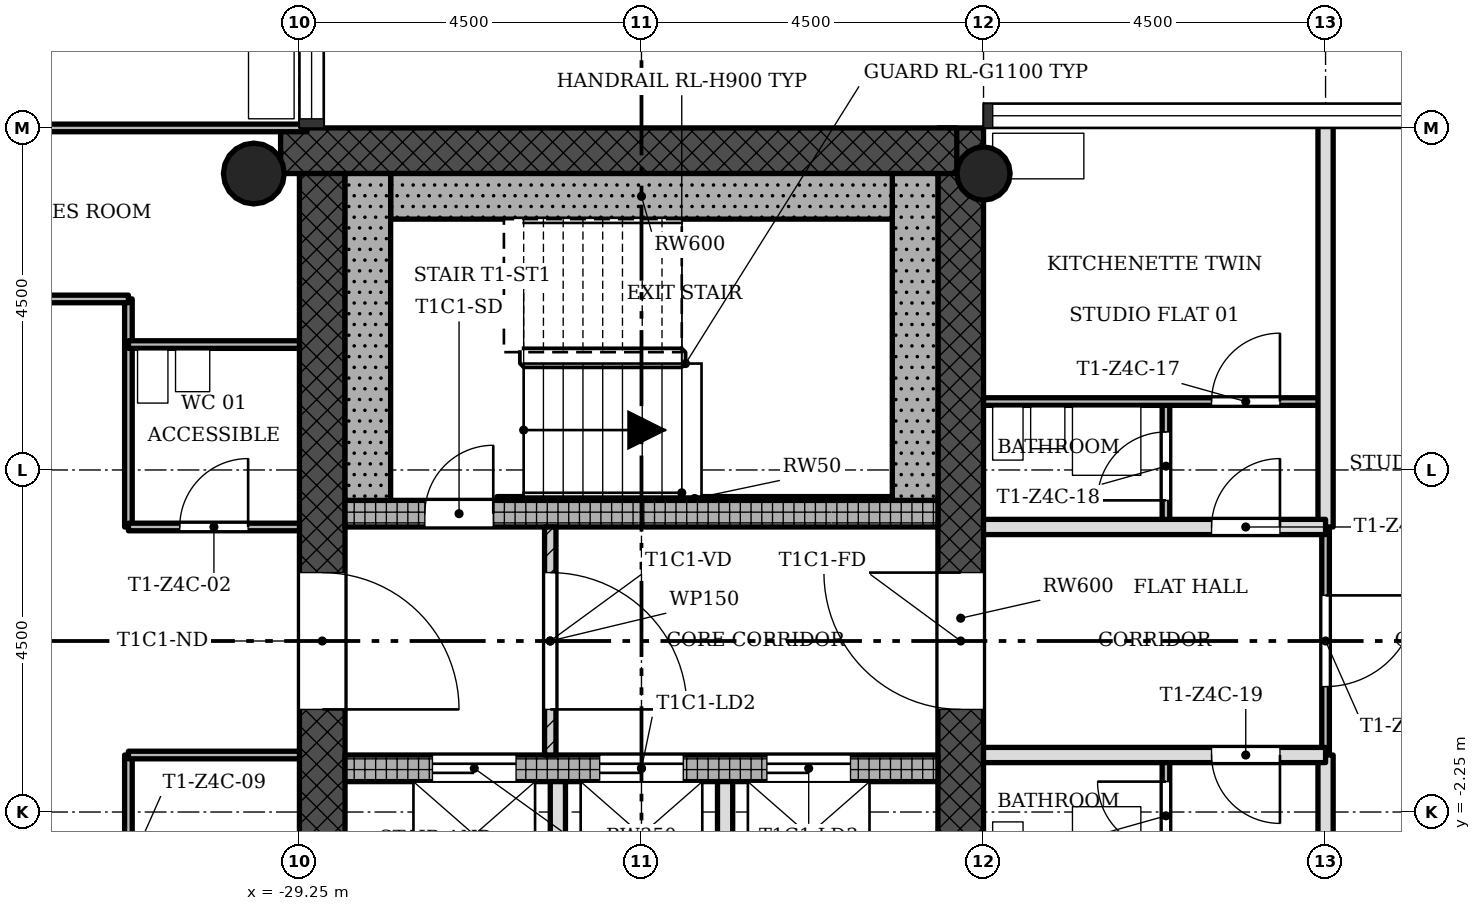
"""IFC4 building model, lengths in metres.
Left out: names, types, materials, properties, quantities, classifications, styles, units other than length and angle.
Written with IfcOpenShell. Run it as: python <this file> out.ifc"""

import sys

from ifc_helpers import new_model, si_unit, direction, frame, frame_2d, origin, origin_2d, place, context, subcontext, project, spatial, rectangle, hollow_circle, extrude, element, fill, save


model = new_model("IFC4")
c1 = context("Model", 3, precision=1e-05, world=origin(), true_north=direction((0.0, 1.0)))
c2 = subcontext(c1, "Body", "Model", "MODEL_VIEW")
j1 = project(units=[si_unit("LENGTHUNIT", "METRE"), si_unit("PLANEANGLEUNIT", "RADIAN")], contexts=[c1])
p1 = place(None, origin())
s1 = spatial("IfcSite", under=j1, at=p1, CompositionType="ELEMENT")
p2 = place(p1, origin())
s2 = spatial("IfcBuilding", under=s1, at=p2, CompositionType="ELEMENT")
p3 = place(p2, frame((0.0, 0.0, 192.6)))
s3 = spatial("IfcBuildingStorey", under=s2, at=p3, CompositionType="ELEMENT", Elevation=192.6)
p4 = place(p3, frame((-20.55, -6.15, 0.0), z_axis=(0.0, 0.0, 1.0), x_axis=(0.0, 1.0, 0.0)))
e1 = element("IfcWall", 1, at=p4, inside=s3, PredefinedType="SHEAR", context=c2, shape_type="SweptSolid", body=[
    extrude(rectangle(XDim=12.9, YDim=0.6, at=frame_2d((6.45, 0.0))), origin(), (0.0, 0.0, 1.0), 3.4),
])
p5 = place(p4, frame((5.25, 0.0, 0.0)))
e2 = element("IfcOpeningElement", 2, at=p5, cuts=e1, PredefinedType="OPENING", context=c2, shape_type="SweptSolid", body=[
    extrude(rectangle(XDim=1.8, YDim=2.1, at=frame_2d((0.9, 1.05))), frame((0.0, 0.31, 0.0), z_axis=(0.0, -1.0, 0.0), x_axis=(1.0, 0.0, 0.0)), (0.0, 0.0, 1.0), 0.62),
])
p6 = place(p3, frame((-20.602, 6.45, 0.0), z_axis=(0.0, 0.0, 1.0), x_axis=(-1.0, 0.0, 0.0)))
e3 = element("IfcWall", 3, at=p6, inside=s3, PredefinedType="SHEAR", context=c2, shape_type="SweptSolid", body=[
    extrude(rectangle(XDim=8.896, YDim=0.6, at=frame_2d((4.448, 0.0))), origin(), (0.0, 0.0, 1.0), 3.4),
])
p7 = place(p3, frame((-28.95, 6.15, 0.0), z_axis=(0.0, 0.0, 1.0), x_axis=(0.0, -1.0, 0.0)))
e4 = element("IfcWall", 4, at=p7, inside=s3, PredefinedType="SHEAR", context=c2, shape_type="SweptSolid", body=[
    extrude(rectangle(XDim=12.9, YDim=0.6, at=frame_2d((6.45, 0.0))), origin(), (0.0, 0.0, 1.0), 3.4),
])
p8 = place(p7, frame((5.25, 0.0, 0.0)))
e5 = element("IfcOpeningElement", 5, at=p8, cuts=e4, PredefinedType="OPENING", context=c2, shape_type="SweptSolid", body=[
    extrude(rectangle(XDim=1.8, YDim=2.1, at=frame_2d((0.9, 1.05))), frame((0.0, 0.31, 0.0), z_axis=(0.0, -1.0, 0.0), x_axis=(1.0, 0.0, 0.0)), (0.0, 0.0, 1.0), 0.62),
])
p9 = place(p3, frame((-28.65, -1.675, 0.0), z_axis=(0.0, 0.0, 1.0), x_axis=(1.0, 0.0, 0.0)))
e6 = element("IfcWall", 6, at=p9, inside=s3, PredefinedType="SHEAR", context=c2, shape_type="SweptSolid", body=[
    extrude(rectangle(XDim=7.8, YDim=0.35, at=frame_2d((3.9, 0.0))), origin(), (0.0, 0.0, 1.0), 3.4),
])
p10 = place(p9, frame((1.15, 0.0, 0.0)))
e7 = element("IfcOpeningElement", 7, at=p10, cuts=e6, PredefinedType="OPENING", context=c2, shape_type="SweptSolid", body=[
    extrude(rectangle(XDim=1.1, YDim=2.1, at=frame_2d((0.55, 1.05))), frame((0.0, 0.185, 0.0), z_axis=(0.0, -1.0, 0.0), x_axis=(1.0, 0.0, 0.0)), (0.0, 0.0, 1.0), 0.37),
])
p11 = place(p9, frame((3.35, 0.0, 0.0)))
e8 = element("IfcOpeningElement", 8, at=p11, cuts=e6, PredefinedType="OPENING", context=c2, shape_type="SweptSolid", body=[
    extrude(rectangle(XDim=1.1, YDim=2.1, at=frame_2d((0.55, 1.05))), frame((0.0, 0.185, 0.0), z_axis=(0.0, -1.0, 0.0), x_axis=(1.0, 0.0, 0.0)), (0.0, 0.0, 1.0), 0.37),
])
p12 = place(p9, frame((5.55, 0.0, 0.0)))
e9 = element("IfcOpeningElement", 9, at=p12, cuts=e6, PredefinedType="OPENING", context=c2, shape_type="SweptSolid", body=[
    extrude(rectangle(XDim=1.1, YDim=2.1, at=frame_2d((0.55, 1.05))), frame((0.0, 0.185, 0.0), z_axis=(0.0, -1.0, 0.0), x_axis=(1.0, 0.0, 0.0)), (0.0, 0.0, 1.0), 0.37),
])
p13 = place(p3, frame((-28.65, 1.675, 0.0), z_axis=(0.0, 0.0, 1.0), x_axis=(1.0, 0.0, 0.0)))
e10 = element("IfcWall", 10, at=p13, inside=s3, PredefinedType="SHEAR", context=c2, shape_type="SweptSolid", body=[
    extrude(rectangle(XDim=7.8, YDim=0.35, at=frame_2d((3.9, 0.0))), origin(), (0.0, 0.0, 1.0), 3.4),
])
p14 = place(p13, frame((1.05, 0.0, 0.0)))
e11 = element("IfcOpeningElement", 11, at=p14, cuts=e10, PredefinedType="OPENING", context=c2, shape_type="SweptSolid", body=[
    extrude(rectangle(XDim=0.9, YDim=2.1, at=frame_2d((0.45, 1.05))), frame((0.0, 0.185, 0.0), z_axis=(0.0, -1.0, 0.0), x_axis=(1.0, 0.0, 0.0)), (0.0, 0.0, 1.0), 0.37),
])
p15 = place(p3, frame((-20.25, 6.15, 0.0), z_axis=(0.0, 0.0, 1.0), x_axis=(1.0, 0.0, 0.0)))
e12 = element("IfcColumn", 12, at=p15, inside=s3, PredefinedType="COLUMN", context=c2, shape_type="SweptSolid", body=[
    extrude(hollow_circle(Radius=0.35, WallThickness=0.025, at=origin_2d()), origin(), (0.0, 0.0, 1.0), 3.4),
])
p16 = place(p3, frame((-29.85, 6.15, 0.0), z_axis=(0.0, 0.0, 1.0), x_axis=(1.0, 0.0, 0.0)))
e13 = element("IfcColumn", 13, at=p16, inside=s3, PredefinedType="COLUMN", context=c2, shape_type="SweptSolid", body=[
    extrude(hollow_circle(Radius=0.4, WallThickness=0.028, at=origin_2d()), origin(), (0.0, 0.0, 1.0), 3.4),
])
p17 = place(p3, frame((-25.95, -1.5, 0.0), z_axis=(0.0, 0.0, 1.0), x_axis=(0.0, 1.0, 0.0)))
e14 = element("IfcWall", 14, at=p17, inside=s3, PredefinedType="PARTITIONING", context=c2, shape_type="SweptSolid", body=[
    extrude(rectangle(XDim=3.0, YDim=0.15, at=frame_2d((1.5, 0.0))), origin(), (0.0, 0.0, 1.0), 3.0),
])
p18 = place(p17, frame((0.6, 0.0, 0.0)))
e15 = element("IfcOpeningElement", 15, at=p18, cuts=e14, PredefinedType="OPENING", context=c2, shape_type="SweptSolid", body=[
    extrude(rectangle(XDim=1.8, YDim=2.1, at=frame_2d((0.9, 1.05))), frame((0.0, 0.085, 0.0), z_axis=(0.0, -1.0, 0.0), x_axis=(1.0, 0.0, 0.0)), (0.0, 0.0, 1.0), 0.17),
])
for number, where, z_axis, x_axis in (
    (16, (-25.85, -6.15, 0.0), (0.0, 0.0, 1.0), (0.0, 1.0, 0.0)),
    (17, (-23.65, -6.15, 0.0), (0.0, 0.0, 1.0), (0.0, 1.0, 0.0)),
):
    element("IfcWall", number, at=place(p3, frame(where, z_axis=z_axis, x_axis=x_axis)), inside=s3, PredefinedType="SOLIDWALL", context=c2, shape_type="SweptSolid", body=[
        extrude(rectangle(XDim=4.3, YDim=0.2, at=frame_2d((2.15, 0.0))), origin(), (0.0, 0.0, 1.0), 3.0),
    ])
p19 = place(p3, frame((-31.5, -6.75, 0.0), z_axis=(0.0, 0.0, 1.0), x_axis=(0.0, 1.0, 0.0)))
e18 = element("IfcWall", 18, at=p19, inside=s3, PredefinedType="PARTITIONING", context=c2, shape_type="SweptSolid", body=[
    extrude(rectangle(XDim=5.25, YDim=0.1, at=frame_2d((2.625, 0.0))), origin(), (0.0, 0.0, 1.0), 3.0),
])
p20 = place(p19, frame((3.3, 0.0, 0.0)))
e19 = element("IfcOpeningElement", 19, at=p20, cuts=e18, PredefinedType="OPENING", context=c2, shape_type="SweptSolid", body=[
    extrude(rectangle(XDim=0.9, YDim=2.1, at=frame_2d((0.45, 1.05))), frame((0.0, 0.06, 0.0), z_axis=(0.0, -1.0, 0.0), x_axis=(1.0, 0.0, 0.0)), (0.0, 0.0, 1.0), 0.12),
])
p21 = place(p3, frame((-31.5, 1.5, 0.0), z_axis=(0.0, 0.0, 1.0), x_axis=(0.0, 1.0, 0.0)))
e20 = element("IfcWall", 20, at=p21, inside=s3, PredefinedType="PARTITIONING", context=c2, shape_type="SweptSolid", body=[
    extrude(rectangle(XDim=3.0, YDim=0.1, at=frame_2d((1.5, 0.0))), origin(), (0.0, 0.0, 1.0), 3.0),
])
p22 = place(p3, frame((-17.85, -3.15, 0.0), z_axis=(0.0, 0.0, 1.0), x_axis=(0.0, 1.0, 0.0)))
e21 = element("IfcWall", 21, at=p22, inside=s3, PredefinedType="PARTITIONING", context=c2, shape_type="SweptSolid", body=[
    extrude(rectangle(XDim=1.65, YDim=0.1, at=frame_2d((0.825, 0.0))), origin(), (0.0, 0.0, 1.0), 3.0),
])
p23 = place(p22, frame((0.4, 0.0, 0.0)))
e22 = element("IfcOpeningElement", 22, at=p23, cuts=e21, PredefinedType="OPENING", context=c2, shape_type="SweptSolid", body=[
    extrude(rectangle(XDim=0.9, YDim=2.1, at=frame_2d((0.45, 1.05))), frame((0.0, 0.06, 0.0), z_axis=(0.0, -1.0, 0.0), x_axis=(1.0, 0.0, 0.0)), (0.0, 0.0, 1.0), 0.12),
])
p24 = place(p3, frame((-17.85, 1.5, 0.0), z_axis=(0.0, 0.0, 1.0), x_axis=(0.0, 1.0, 0.0)))
e23 = element("IfcWall", 23, at=p24, inside=s3, PredefinedType="PARTITIONING", context=c2, shape_type="SweptSolid", body=[
    extrude(rectangle(XDim=1.65, YDim=0.1, at=frame_2d((0.825, 0.0))), origin(), (0.0, 0.0, 1.0), 3.0),
])
p25 = place(p24, frame((0.35, 0.0, 0.0)))
e24 = element("IfcOpeningElement", 24, at=p25, cuts=e23, PredefinedType="OPENING", context=c2, shape_type="SweptSolid", body=[
    extrude(rectangle(XDim=0.9, YDim=2.1, at=frame_2d((0.45, 1.05))), frame((0.0, 0.06, 0.0), z_axis=(0.0, -1.0, 0.0), x_axis=(1.0, 0.0, 0.0)), (0.0, 0.0, 1.0), 0.12),
])
p26 = place(p3, frame((-15.75, -1.5, 0.0), z_axis=(0.0, 0.0, 1.0), x_axis=(0.0, 1.0, 0.0)))
e25 = element("IfcWall", 25, at=p26, inside=s3, PredefinedType="PARTITIONING", context=c2, shape_type="SweptSolid", body=[
    extrude(rectangle(XDim=3.0, YDim=0.1, at=frame_2d((1.5, 0.0))), origin(), (0.0, 0.0, 1.0), 3.0),
])
p27 = place(p26, frame((0.9, 0.0, 0.0)))
e26 = element("IfcOpeningElement", 26, at=p27, cuts=e25, PredefinedType="OPENING", context=c2, shape_type="SweptSolid", body=[
    extrude(rectangle(XDim=1.2, YDim=2.1, at=frame_2d((0.6, 1.05))), frame((0.0, 0.06, 0.0), z_axis=(0.0, -1.0, 0.0), x_axis=(1.0, 0.0, 0.0)), (0.0, 0.0, 1.0), 0.12),
])
for number, where, z_axis, x_axis in (
    (27, (-15.75, -6.85, 0.0), (0.0, 0.0, 1.0), (0.0, 1.0, 0.0)),
    (28, (-15.75, 1.5, 0.0), (0.0, 0.0, 1.0), (0.0, 1.0, 0.0)),
):
    element("IfcWall", number, at=place(p3, frame(where, z_axis=z_axis, x_axis=x_axis)), inside=s3, PredefinedType="SOLIDWALL", context=c2, shape_type="SweptSolid", body=[
        extrude(rectangle(XDim=5.35, YDim=0.2, at=frame_2d((2.675, 0.0))), origin(), (0.0, 0.0, 1.0), 3.0),
    ])
p28 = place(p3, frame((-31.5, -1.5, 0.0), z_axis=(0.0, 0.0, 1.0), x_axis=(1.0, 0.0, 0.0)))
e29 = element("IfcWall", 29, at=p28, inside=s3, PredefinedType="PARTITIONING", context=c2, shape_type="SweptSolid", body=[
    extrude(rectangle(XDim=2.25, YDim=0.1, at=frame_2d((1.125, 0.0))), origin(), (0.0, 0.0, 1.0), 3.0),
])
p29 = place(p3, frame((-20.25, -1.5, 0.0), z_axis=(0.0, 0.0, 1.0), x_axis=(1.0, 0.0, 0.0)))
e30 = element("IfcWall", 30, at=p29, inside=s3, PredefinedType="SOLIDWALL", context=c2, shape_type="SweptSolid", body=[
    extrude(rectangle(XDim=4.5, YDim=0.2, at=frame_2d((2.25, 0.0))), origin(), (0.0, 0.0, 1.0), 3.0),
])
p30 = place(p29, frame((3.0, 0.0, 0.0)))
e31 = element("IfcOpeningElement", 31, at=p30, cuts=e30, PredefinedType="OPENING", context=c2, shape_type="SweptSolid", body=[
    extrude(rectangle(XDim=0.9, YDim=2.1, at=frame_2d((0.45, 1.05))), frame((0.0, 0.11, 0.0), z_axis=(0.0, -1.0, 0.0), x_axis=(1.0, 0.0, 0.0)), (0.0, 0.0, 1.0), 0.22),
])
p31 = place(p3, frame((-31.5, 1.5, 0.0), z_axis=(0.0, 0.0, 1.0), x_axis=(1.0, 0.0, 0.0)))
e32 = element("IfcWall", 32, at=p31, inside=s3, PredefinedType="PARTITIONING", context=c2, shape_type="SweptSolid", body=[
    extrude(rectangle(XDim=2.25, YDim=0.1, at=frame_2d((1.125, 0.0))), origin(), (0.0, 0.0, 1.0), 3.0),
])
p32 = place(p31, frame((0.675, 0.0, 0.0)))
e33 = element("IfcOpeningElement", 33, at=p32, cuts=e32, PredefinedType="OPENING", context=c2, shape_type="SweptSolid", body=[
    extrude(rectangle(XDim=0.9, YDim=2.1, at=frame_2d((0.45, 1.05))), frame((0.0, 0.06, 0.0), z_axis=(0.0, -1.0, 0.0), x_axis=(1.0, 0.0, 0.0)), (0.0, 0.0, 1.0), 0.12),
])
p33 = place(p3, frame((-20.25, 1.5, 0.0), z_axis=(0.0, 0.0, 1.0), x_axis=(1.0, 0.0, 0.0)))
e34 = element("IfcWall", 34, at=p33, inside=s3, PredefinedType="SOLIDWALL", context=c2, shape_type="SweptSolid", body=[
    extrude(rectangle(XDim=4.5, YDim=0.2, at=frame_2d((2.25, 0.0))), origin(), (0.0, 0.0, 1.0), 3.0),
])
p34 = place(p33, frame((3.0, 0.0, 0.0)))
e35 = element("IfcOpeningElement", 35, at=p34, cuts=e34, PredefinedType="OPENING", context=c2, shape_type="SweptSolid", body=[
    extrude(rectangle(XDim=0.9, YDim=2.1, at=frame_2d((0.45, 1.05))), frame((0.0, 0.11, 0.0), z_axis=(0.0, -1.0, 0.0), x_axis=(1.0, 0.0, 0.0)), (0.0, 0.0, 1.0), 0.22),
])
p35 = place(p3, frame((-20.25, 3.15, 0.0), z_axis=(0.0, 0.0, 1.0), x_axis=(1.0, 0.0, 0.0)))
e36 = element("IfcWall", 36, at=p35, inside=s3, PredefinedType="PARTITIONING", context=c2, shape_type="SweptSolid", body=[
    extrude(rectangle(XDim=4.5, YDim=0.1, at=frame_2d((2.25, 0.0))), origin(), (0.0, 0.0, 1.0), 3.0),
])
p36 = place(p35, frame((3.0, 0.0, 0.0)))
e37 = element("IfcOpeningElement", 37, at=p36, cuts=e36, PredefinedType="OPENING", context=c2, shape_type="SweptSolid", body=[
    extrude(rectangle(XDim=0.9, YDim=2.1, at=frame_2d((0.45, 1.05))), frame((0.0, 0.06, 0.0), z_axis=(0.0, -1.0, 0.0), x_axis=(1.0, 0.0, 0.0)), (0.0, 0.0, 1.0), 0.12),
])
p37 = place(p3, frame((-31.5, 3.9, 0.0), z_axis=(0.0, 0.0, 1.0), x_axis=(1.0, 0.0, 0.0)))
e38 = element("IfcWall", 38, at=p37, inside=s3, PredefinedType="PARTITIONING", context=c2, shape_type="SweptSolid", body=[
    extrude(rectangle(XDim=2.25, YDim=0.1, at=frame_2d((1.125, 0.0))), origin(), (0.0, 0.0, 1.0), 3.0),
])
p38 = place(p3, frame((-35.1, 4.5, 0.0), z_axis=(0.0, 0.0, 1.0), x_axis=(1.0, 0.0, 0.0)))
e39 = element("IfcWall", 39, at=p38, inside=s3, PredefinedType="PARTITIONING", context=c2, shape_type="SweptSolid", body=[
    extrude(rectangle(XDim=3.6, YDim=0.1, at=frame_2d((1.8, 0.0))), origin(), (0.0, 0.0, 1.0), 3.0),
])
p39 = place(p38, frame((1.35, 0.0, 0.0)))
e40 = element("IfcOpeningElement", 40, at=p39, cuts=e39, PredefinedType="OPENING", context=c2, shape_type="SweptSolid", body=[
    extrude(rectangle(XDim=0.9, YDim=2.1, at=frame_2d((0.45, 1.05))), frame((0.0, 0.06, 0.0), z_axis=(0.0, -1.0, 0.0), x_axis=(1.0, 0.0, 0.0)), (0.0, 0.0, 1.0), 0.12),
])
p40 = place(p3, frame((-35.1, 6.75, 0.0), z_axis=(0.0, 0.0, 1.0), x_axis=(1.0, 0.0, 0.0)))
e41 = element("IfcWall", 41, at=p40, inside=s3, PredefinedType="PARTITIONING", context=c2, shape_type="SweptSolid", body=[
    extrude(rectangle(XDim=5.95, YDim=0.1, at=frame_2d((2.975, 0.0))), origin(), (0.0, 0.0, 1.0), 3.0),
])
p41 = place(p3, frame((-21.15, 1.85, 0.0), z_axis=(0.0, 0.0, 1.0), x_axis=(0.0, 1.0, 0.0)))
e42 = element("IfcWall", 42, at=p41, inside=s3, PredefinedType="SHEAR", context=c2, shape_type="SweptSolid", body=[
    extrude(rectangle(XDim=4.3, YDim=0.6, at=frame_2d((2.15, 0.0))), origin(), (0.0, 0.0, 1.0), 3.4),
])
p42 = place(p3, frame((-28.05, 5.85, 0.0), z_axis=(0.0, 0.0, 1.0), x_axis=(1.0, 0.0, 0.0)))
e43 = element("IfcWall", 43, at=p42, inside=s3, PredefinedType="SHEAR", context=c2, shape_type="SweptSolid", body=[
    extrude(rectangle(XDim=6.6, YDim=0.6, at=frame_2d((3.3, 0.0))), origin(), (0.0, 0.0, 1.0), 3.4),
])
p43 = place(p3, frame((-28.35, 1.85, 0.0), z_axis=(0.0, 0.0, 1.0), x_axis=(0.0, 1.0, 0.0)))
e44 = element("IfcWall", 44, at=p43, inside=s3, PredefinedType="SHEAR", context=c2, shape_type="SweptSolid", body=[
    extrude(rectangle(XDim=4.3, YDim=0.6, at=frame_2d((2.15, 0.0))), origin(), (0.0, 0.0, 1.0), 3.4),
])
p44 = place(p3, frame((-26.65, 1.875, 0.0), z_axis=(0.0, 0.0, 1.0), x_axis=(1.0, 0.0, 0.0)))
e45 = element("IfcWall", 45, at=p44, inside=s3, PredefinedType="SHEAR", context=c2, shape_type="SweptSolid", body=[
    extrude(rectangle(XDim=5.2, YDim=0.05, at=frame_2d((2.6, 0.0))), origin(), (0.0, 0.0, 1.0), 3.4),
])
p45 = place(p18, origin())
e46 = element("IfcDoor", 46, at=p45, inside=s3, OperationType="SINGLE_SWING_LEFT", PredefinedType="DOOR", context=c2, shape_type="SweptSolid", body=[
    extrude(rectangle(XDim=1.8, YDim=2.1, at=frame_2d((0.9, 1.05))), frame((0.0, 0.025, 0.0), z_axis=(0.0, -1.0, 0.0), x_axis=(1.0, 0.0, 0.0)), (0.0, 0.0, 1.0), 0.05),
])
fill(e15, e46)
p46 = place(p32, origin())
e47 = element("IfcDoor", 47, at=p46, inside=s3, OperationType="SINGLE_SWING_LEFT", PredefinedType="DOOR", context=c2, shape_type="SweptSolid", body=[
    extrude(rectangle(XDim=0.9, YDim=2.1, at=frame_2d((0.45, 1.05))), frame((0.0, 0.025, 0.0), z_axis=(0.0, -1.0, 0.0), x_axis=(1.0, 0.0, 0.0)), (0.0, 0.0, 1.0), 0.05),
])
fill(e33, e47)
p47 = place(p34, origin())
e48 = element("IfcDoor", 48, at=p47, inside=s3, OperationType="SINGLE_SWING_LEFT", PredefinedType="DOOR", context=c2, shape_type="SweptSolid", body=[
    extrude(rectangle(XDim=0.9, YDim=2.1, at=frame_2d((0.45, 1.05))), frame((0.0, 0.025, 0.0), z_axis=(0.0, -1.0, 0.0), x_axis=(1.0, 0.0, 0.0)), (0.0, 0.0, 1.0), 0.05),
])
fill(e35, e48)
p48 = place(p36, origin())
e49 = element("IfcDoor", 49, at=p48, inside=s3, OperationType="SINGLE_SWING_LEFT", PredefinedType="DOOR", context=c2, shape_type="SweptSolid", body=[
    extrude(rectangle(XDim=0.9, YDim=2.1, at=frame_2d((0.45, 1.05))), frame((0.0, 0.025, 0.0), z_axis=(0.0, -1.0, 0.0), x_axis=(1.0, 0.0, 0.0)), (0.0, 0.0, 1.0), 0.05),
])
fill(e37, e49)
p49 = place(p25, origin())
e50 = element("IfcDoor", 50, at=p49, inside=s3, OperationType="SINGLE_SWING_RIGHT", PredefinedType="DOOR", context=c2, shape_type="SweptSolid", body=[
    extrude(rectangle(XDim=0.9, YDim=2.1, at=frame_2d((0.45, 1.05))), frame((0.0, 0.025, 0.0), z_axis=(0.0, -1.0, 0.0), x_axis=(1.0, 0.0, 0.0)), (0.0, 0.0, 1.0), 0.05),
])
fill(e24, e50)
p50 = place(p30, origin())
e51 = element("IfcDoor", 51, at=p50, inside=s3, OperationType="SINGLE_SWING_RIGHT", PredefinedType="DOOR", context=c2, shape_type="SweptSolid", body=[
    extrude(rectangle(XDim=0.9, YDim=2.1, at=frame_2d((0.45, 1.05))), frame((0.0, 0.025, 0.0), z_axis=(0.0, -1.0, 0.0), x_axis=(1.0, 0.0, 0.0)), (0.0, 0.0, 1.0), 0.05),
])
fill(e31, e51)
p51 = place(p23, origin())
e52 = element("IfcDoor", 52, at=p51, inside=s3, OperationType="SINGLE_SWING_LEFT", PredefinedType="DOOR", context=c2, shape_type="SweptSolid", body=[
    extrude(rectangle(XDim=0.9, YDim=2.1, at=frame_2d((0.45, 1.05))), frame((0.0, 0.025, 0.0), z_axis=(0.0, -1.0, 0.0), x_axis=(1.0, 0.0, 0.0)), (0.0, 0.0, 1.0), 0.05),
])
fill(e22, e52)
p52 = place(p27, origin())
e53 = element("IfcDoor", 53, at=p52, inside=s3, OperationType="SINGLE_SWING_RIGHT", PredefinedType="DOOR", context=c2, shape_type="SweptSolid", body=[
    extrude(rectangle(XDim=1.2, YDim=2.1, at=frame_2d((0.6, 1.05))), frame((0.0, 0.025, 0.0), z_axis=(0.0, -1.0, 0.0), x_axis=(1.0, 0.0, 0.0)), (0.0, 0.0, 1.0), 0.05),
])
fill(e26, e53)
p53 = place(p14, origin())
e54 = element("IfcDoor", 54, at=p53, inside=s3, OperationType="SINGLE_SWING_LEFT", PredefinedType="DOOR", context=c2, shape_type="SweptSolid", body=[
    extrude(rectangle(XDim=0.9, YDim=2.1, at=frame_2d((0.45, 1.05))), frame((0.0, 0.025, 0.0), z_axis=(0.0, -1.0, 0.0), x_axis=(1.0, 0.0, 0.0)), (0.0, 0.0, 1.0), 0.05),
])
fill(e11, e54)
p54 = place(p10, origin())
e55 = element("IfcDoor", 55, at=p54, inside=s3, OperationType="SLIDING_TO_LEFT", PredefinedType="DOOR", context=c2, shape_type="SweptSolid", body=[
    extrude(rectangle(XDim=1.1, YDim=2.1, at=frame_2d((0.55, 1.05))), frame((0.0, 0.025, 0.0), z_axis=(0.0, -1.0, 0.0), x_axis=(1.0, 0.0, 0.0)), (0.0, 0.0, 1.0), 0.05),
])
fill(e7, e55)
p55 = place(p11, origin())
e56 = element("IfcDoor", 56, at=p55, inside=s3, OperationType="SLIDING_TO_LEFT", PredefinedType="DOOR", context=c2, shape_type="SweptSolid", body=[
    extrude(rectangle(XDim=1.1, YDim=2.1, at=frame_2d((0.55, 1.05))), frame((0.0, 0.025, 0.0), z_axis=(0.0, -1.0, 0.0), x_axis=(1.0, 0.0, 0.0)), (0.0, 0.0, 1.0), 0.05),
])
fill(e8, e56)
p56 = place(p12, origin())
e57 = element("IfcDoor", 57, at=p56, inside=s3, OperationType="SLIDING_TO_LEFT", PredefinedType="DOOR", context=c2, shape_type="SweptSolid", body=[
    extrude(rectangle(XDim=1.1, YDim=2.1, at=frame_2d((0.55, 1.05))), frame((0.0, 0.025, 0.0), z_axis=(0.0, -1.0, 0.0), x_axis=(1.0, 0.0, 0.0)), (0.0, 0.0, 1.0), 0.05),
])
fill(e9, e57)
p57 = place(p8, origin())
e58 = element("IfcDoor", 58, at=p57, inside=s3, OperationType="SINGLE_SWING_LEFT", PredefinedType="DOOR", context=c2, shape_type="SweptSolid", body=[
    extrude(rectangle(XDim=1.8, YDim=2.1, at=frame_2d((0.9, 1.05))), frame((0.0, 0.025, 0.0), z_axis=(0.0, -1.0, 0.0), x_axis=(1.0, 0.0, 0.0)), (0.0, 0.0, 1.0), 0.05),
])
fill(e5, e58)
p58 = place(p5, origin())
e59 = element("IfcDoor", 59, at=p58, inside=s3, OperationType="SINGLE_SWING_LEFT", PredefinedType="DOOR", context=c2, shape_type="SweptSolid", body=[
    extrude(rectangle(XDim=1.8, YDim=2.1, at=frame_2d((0.9, 1.05))), frame((0.0, 0.025, 0.0), z_axis=(0.0, -1.0, 0.0), x_axis=(1.0, 0.0, 0.0)), (0.0, 0.0, 1.0), 0.05),
])
fill(e2, e59)
save(model, sys.argv[1])
